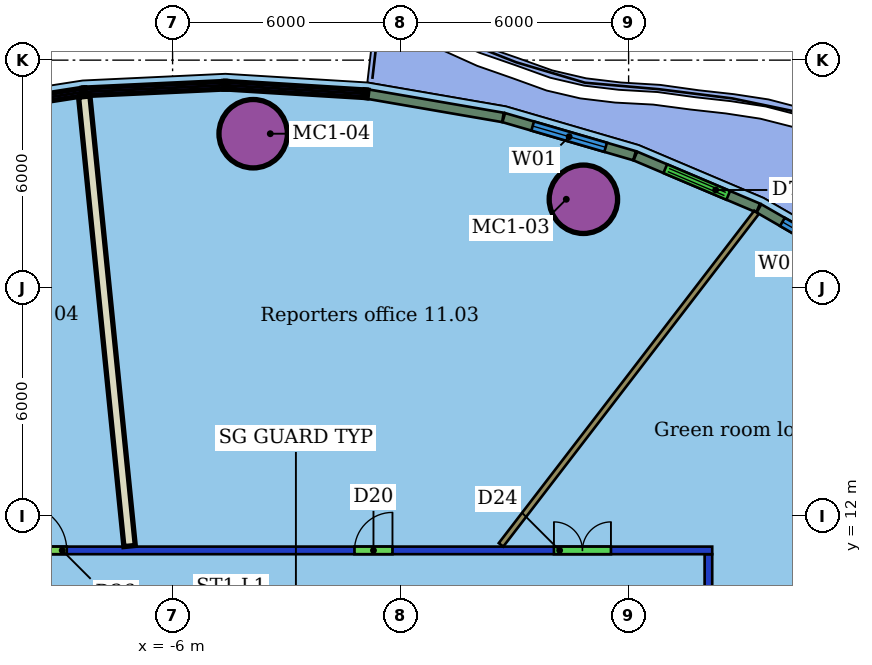
"""IFC4 building model, lengths in metres.
Left out: names, types, materials, properties, quantities, classifications, styles, units other than length and angle.
Written with IfcOpenShell. Run it as: python <this file> out.ifc"""

import sys

from ifc_helpers import new_model, si_unit, direction, frame, frame_2d, origin, origin_2d, place, context, subcontext, project, spatial, rectangle, hollow_circle, extrude, element, fill, save


model = new_model("IFC4")
c1 = context("Model", 3, precision=1e-05, world=origin(), true_north=direction((0.0, 1.0)))
c2 = subcontext(c1, "Body", "Model", "MODEL_VIEW")
j1 = project(units=[si_unit("LENGTHUNIT", "METRE"), si_unit("PLANEANGLEUNIT", "RADIAN")], contexts=[c1])
p1 = place(None, origin())
s1 = spatial("IfcSite", under=j1, at=p1, CompositionType="ELEMENT")
p2 = place(p1, origin())
s2 = spatial("IfcBuilding", under=s1, at=p2, CompositionType="ELEMENT")
p3 = place(p2, frame((0.0, 0.0, 58.2)))
s3 = spatial("IfcBuildingStorey", under=s2, at=p3, CompositionType="ELEMENT", Elevation=58.2)
for number, where, z_axis, x_axis in (
    (1, (4.81, 20.339, 0.0), (0.0, 0.0, 1.0), (1.0, 0.0, 0.0)),
    (2, (-3.879, 22.064, 0.0), (0.0, 0.0, 1.0), (1.0, 0.0, 0.0)),
):
    element("IfcColumn", number, at=place(p3, frame(where, z_axis=z_axis, x_axis=x_axis)), inside=s3, PredefinedType="COLUMN", context=c2, shape_type="SweptSolid", body=[
        extrude(hollow_circle(Radius=0.9, WallThickness=0.06, at=origin_2d()), origin(), (0.0, 0.0, 1.0), 3.55),
    ])
p4 = place(p3, frame((-20.2, 11.1, 0.0), z_axis=(0.0, 0.0, 1.0), x_axis=(1.0, 0.0, 0.0)))
e3 = element("IfcWall", 3, at=p4, inside=s3, PredefinedType="PARTITIONING", context=c2, shape_type="SweptSolid", body=[
    extrude(rectangle(XDim=28.4, YDim=0.2, at=frame_2d((14.2, 0.0))), origin(), (0.0, 0.0, 1.0), 2.85),
])
p5 = place(p4, frame((24.235, 0.0, 0.0)))
e4 = element("IfcOpeningElement", 4, at=p5, cuts=e3, PredefinedType="OPENING", context=c2, shape_type="SweptSolid", body=[
    extrude(rectangle(XDim=1.5, YDim=2.1, at=frame_2d((0.75, 1.05))), frame((0.0, 0.11, 0.0), z_axis=(0.0, -1.0, 0.0), x_axis=(1.0, 0.0, 0.0)), (0.0, 0.0, 1.0), 0.22),
])
p6 = place(p4, frame((18.986, 0.0, 0.0)))
e5 = element("IfcOpeningElement", 5, at=p6, cuts=e3, PredefinedType="OPENING", context=c2, shape_type="SweptSolid", body=[
    extrude(rectangle(XDim=1.0, YDim=2.1, at=frame_2d((0.5, 1.05))), frame((0.0, 0.11, 0.0), z_axis=(0.0, -1.0, 0.0), x_axis=(1.0, 0.0, 0.0)), (0.0, 0.0, 1.0), 0.22),
])
p7 = place(p4, frame((10.215, 0.0, 0.0)))
e6 = element("IfcOpeningElement", 6, at=p7, cuts=e3, PredefinedType="OPENING", context=c2, shape_type="SweptSolid", body=[
    extrude(rectangle(XDim=1.2, YDim=2.1, at=frame_2d((0.6, 1.05))), frame((0.0, 0.11, 0.0), z_axis=(0.0, -1.0, 0.0), x_axis=(1.0, 0.0, 0.0)), (0.0, 0.0, 1.0), 0.22),
])
p8 = place(p4, frame((5.94, 0.0, 0.0)))
e7 = element("IfcOpeningElement", 7, at=p8, cuts=e3, PredefinedType="OPENING", context=c2, shape_type="SweptSolid", body=[
    extrude(rectangle(XDim=1.0, YDim=2.1, at=frame_2d((0.5, 1.05))), frame((0.0, 0.11, 0.0), z_axis=(0.0, -1.0, 0.0), x_axis=(1.0, 0.0, 0.0)), (0.0, 0.0, 1.0), 0.22),
])
p9 = place(p3, frame((8.1, 11.0, 0.0), z_axis=(0.0, 0.0, 1.0), x_axis=(0.0, -1.0, 0.0)))
e8 = element("IfcWall", 8, at=p9, inside=s3, PredefinedType="PARTITIONING", context=c2, shape_type="SweptSolid", body=[
    extrude(rectangle(XDim=22.0, YDim=0.2, at=frame_2d((11.0, 0.0))), origin(), (0.0, 0.0, 1.0), 2.85),
])
p10 = place(p9, frame((6.475, 0.0, 0.0)))
e9 = element("IfcOpeningElement", 9, at=p10, cuts=e8, PredefinedType="OPENING", context=c2, shape_type="SweptSolid", body=[
    extrude(rectangle(XDim=1.1, YDim=2.1, at=frame_2d((0.55, 1.05))), frame((0.0, 0.11, 0.0), z_axis=(0.0, -1.0, 0.0), x_axis=(1.0, 0.0, 0.0)), (0.0, 0.0, 1.0), 0.22),
])
p11 = place(p9, frame((13.242, 0.0, 0.0)))
e10 = element("IfcOpeningElement", 10, at=p11, cuts=e8, PredefinedType="OPENING", context=c2, shape_type="SweptSolid", body=[
    extrude(rectangle(XDim=0.9, YDim=2.1, at=frame_2d((0.45, 1.05))), frame((0.0, 0.11, 0.0), z_axis=(0.0, -1.0, 0.0), x_axis=(1.0, 0.0, 0.0)), (0.0, 0.0, 1.0), 0.22),
])
p12 = place(p3, frame((17.293, 13.955, 0.0), z_axis=(0.0, 0.0, 1.0), x_axis=(-0.857841161712, -0.513914916375, 0.0)))
e11 = element("IfcWall", 11, at=p12, inside=s3, PredefinedType="PARTITIONING", context=c2, shape_type="SweptSolid", body=[
    extrude(rectangle(XDim=10.51, YDim=0.3, at=frame_2d((5.255, 0.0))), origin(), (0.0, 0.0, 1.0), 3.55),
])
p13 = place(p3, frame((9.365, 19.993, 0.0), z_axis=(0.0, 0.0, 1.0), x_axis=(-0.609349200428, -0.792901981293, 0.0)))
e12 = element("IfcWall", 12, at=p13, inside=s3, PredefinedType="PARTITIONING", context=c2, shape_type="SweptSolid", body=[
    extrude(rectangle(XDim=11.032, YDim=0.15, at=frame_2d((5.516, 0.0))), origin(), (0.0, 0.0, 1.0), 3.55),
])
p14 = place(p3, frame((-8.324, 23.041, 0.0), z_axis=(0.0, 0.0, 1.0), x_axis=(0.100359866634, -0.994951203411, 0.0)))
e13 = element("IfcWall", 13, at=p14, inside=s3, PredefinedType="PARTITIONING", context=c2, shape_type="SweptSolid", body=[
    extrude(rectangle(XDim=11.886, YDim=0.3, at=frame_2d((5.943, 0.0))), origin(), (0.0, 0.0, 1.0), 3.55),
])
p15 = place(p3, frame((12.397, 18.39, 0.0), z_axis=(0.0, 0.0, 1.0), x_axis=(-0.866535553406, 0.499115352081, 0.0)))
e14 = element("IfcWall", 14, at=p15, inside=s3, PredefinedType="SOLIDWALL", context=c2, shape_type="SweptSolid", body=[
    extrude(rectangle(XDim=3.424, YDim=0.25, at=frame_2d((1.712, 0.0))), origin(), (0.0, 0.0, 1.0), 3.15),
])
p16 = place(p15, frame((0.712, 0.0, 0.8)))
e15 = element("IfcOpeningElement", 15, at=p16, cuts=e14, PredefinedType="OPENING", context=c2, shape_type="SweptSolid", body=[
    extrude(rectangle(XDim=2.0, YDim=2.2, at=frame_2d((1.0, 1.1))), frame((0.0, 0.135, 0.0), z_axis=(0.0, -1.0, 0.0), x_axis=(1.0, 0.0, 0.0)), (0.0, 0.0, 1.0), 0.27),
])
p17 = place(p3, frame((9.409, 20.109, 0.0), z_axis=(0.0, 0.0, 1.0), x_axis=(-0.920920201112, 0.389751181119, 0.0)))
e16 = element("IfcWall", 16, at=p17, inside=s3, PredefinedType="SOLIDWALL", context=c2, shape_type="SweptSolid", body=[
    extrude(rectangle(XDim=3.51, YDim=0.25, at=frame_2d((1.755, 0.0))), origin(), (0.0, 0.0, 1.0), 3.15),
])
p18 = place(p17, frame((0.855, 0.0, 0.0)))
e17 = element("IfcOpeningElement", 17, at=p18, cuts=e16, PredefinedType="OPENING", context=c2, shape_type="SweptSolid", body=[
    extrude(rectangle(XDim=1.8, YDim=2.4, at=frame_2d((0.9, 1.2))), frame((0.0, 0.135, 0.0), z_axis=(0.0, -1.0, 0.0), x_axis=(1.0, 0.0, 0.0)), (0.0, 0.0, 1.0), 0.27),
])
p19 = place(p3, frame((6.156, 21.485, 0.0), z_axis=(0.0, 0.0, 1.0), x_axis=(-0.960066333869, 0.279772469287, 0.0)))
e18 = element("IfcWall", 18, at=p19, inside=s3, PredefinedType="SOLIDWALL", context=c2, shape_type="SweptSolid", body=[
    extrude(rectangle(XDim=3.585, YDim=0.25, at=frame_2d((1.792, 0.0))), origin(), (0.0, 0.0, 1.0), 3.15),
])
p20 = place(p19, frame((0.792, 0.0, 0.8)))
e19 = element("IfcOpeningElement", 19, at=p20, cuts=e18, PredefinedType="OPENING", context=c2, shape_type="SweptSolid", body=[
    extrude(rectangle(XDim=2.0, YDim=2.2, at=frame_2d((1.0, 1.1))), frame((0.0, 0.135, 0.0), z_axis=(0.0, -1.0, 0.0), x_axis=(1.0, 0.0, 0.0)), (0.0, 0.0, 1.0), 0.27),
])
p21 = place(p3, frame((2.693, 22.493, 0.0), z_axis=(0.0, 0.0, 1.0), x_axis=(-0.985456592012, 0.169927352892, 0.0)))
e20 = element("IfcWall", 20, at=p21, inside=s3, PredefinedType="SOLIDWALL", context=c2, shape_type="SweptSolid", body=[
    extrude(rectangle(XDim=3.6, YDim=0.25, at=frame_2d((1.8, 0.0))), origin(), (0.0, 0.0, 1.0), 3.15),
])
p22 = place(p5, origin())
e21 = element("IfcDoor", 21, at=p22, inside=s3, OperationType="DOUBLE_DOOR_SINGLE_SWING", PredefinedType="DOOR", context=c2, shape_type="SweptSolid", body=[
    extrude(rectangle(XDim=1.5, YDim=2.1, at=frame_2d((0.75, 1.05))), frame((0.0, 0.025, 0.0), z_axis=(0.0, -1.0, 0.0), x_axis=(1.0, 0.0, 0.0)), (0.0, 0.0, 1.0), 0.05),
])
fill(e4, e21)
p23 = place(p6, origin())
e22 = element("IfcDoor", 22, at=p23, inside=s3, OperationType="SINGLE_SWING_RIGHT", PredefinedType="DOOR", context=c2, shape_type="SweptSolid", body=[
    extrude(rectangle(XDim=1.0, YDim=2.1, at=frame_2d((0.5, 1.05))), frame((0.0, 0.025, 0.0), z_axis=(0.0, -1.0, 0.0), x_axis=(1.0, 0.0, 0.0)), (0.0, 0.0, 1.0), 0.05),
])
fill(e5, e22)
p24 = place(p7, origin())
e23 = element("IfcDoor", 23, at=p24, inside=s3, OperationType="SINGLE_SWING_LEFT", PredefinedType="DOOR", context=c2, shape_type="SweptSolid", body=[
    extrude(rectangle(XDim=1.2, YDim=2.1, at=frame_2d((0.6, 1.05))), frame((0.0, 0.025, 0.0), z_axis=(0.0, -1.0, 0.0), x_axis=(1.0, 0.0, 0.0)), (0.0, 0.0, 1.0), 0.05),
])
fill(e6, e23)
p25 = place(p16, origin())
e24 = element("IfcWindow", 24, at=p25, inside=s3, PartitioningType="SINGLE_PANEL", PredefinedType="WINDOW", context=c2, shape_type="SweptSolid", body=[
    extrude(rectangle(XDim=2.0, YDim=2.2, at=frame_2d((1.0, 1.1))), frame((0.0, 0.03, 0.0), z_axis=(0.0, -1.0, 0.0), x_axis=(1.0, 0.0, 0.0)), (0.0, 0.0, 1.0), 0.06),
])
fill(e15, e24)
p26 = place(p18, origin())
e25 = element("IfcDoor", 25, at=p26, inside=s3, OperationType="DOUBLE_DOOR_SLIDING", PredefinedType="DOOR", context=c2, shape_type="SweptSolid", body=[
    extrude(rectangle(XDim=1.8, YDim=2.4, at=frame_2d((0.9, 1.2))), frame((0.0, 0.025, 0.0), z_axis=(0.0, -1.0, 0.0), x_axis=(1.0, 0.0, 0.0)), (0.0, 0.0, 1.0), 0.05),
])
fill(e17, e25)
p27 = place(p20, origin())
e26 = element("IfcWindow", 26, at=p27, inside=s3, PartitioningType="SINGLE_PANEL", PredefinedType="WINDOW", context=c2, shape_type="SweptSolid", body=[
    extrude(rectangle(XDim=2.0, YDim=2.2, at=frame_2d((1.0, 1.1))), frame((0.0, 0.03, 0.0), z_axis=(0.0, -1.0, 0.0), x_axis=(1.0, 0.0, 0.0)), (0.0, 0.0, 1.0), 0.06),
])
fill(e19, e26)
save(model, sys.argv[1])
